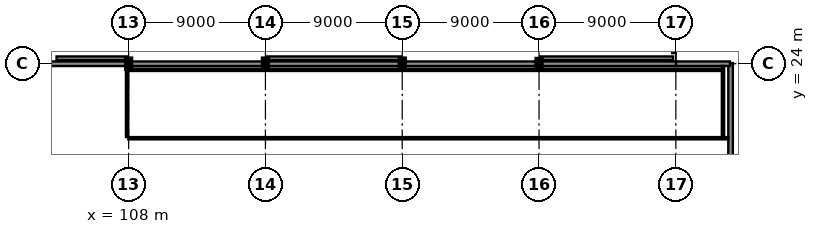
"""IFC4 building model, lengths in metres.
Left out: names, types, materials, properties, quantities, classifications, styles, units other than length and angle.
Written with IfcOpenShell. Run it as: python <this file> out.ifc"""

import sys

from ifc_helpers import new_model, si_unit, direction, frame, frame_2d, origin, origin_2d, place, context, subcontext, project, spatial, rectangle, i_section, extrude, element, fill, save


model = new_model("IFC4")
c1 = context("Model", 3, precision=1e-05, world=origin(), true_north=direction((0.0, 1.0)))
c2 = subcontext(c1, "Body", "Model", "MODEL_VIEW")
j1 = project(units=[si_unit("LENGTHUNIT", "METRE"), si_unit("PLANEANGLEUNIT", "RADIAN")], contexts=[c1])
p1 = place(None, origin())
s1 = spatial("IfcSite", under=j1, at=p1, CompositionType="ELEMENT")
p2 = place(p1, origin())
s2 = spatial("IfcBuilding", under=s1, at=p2, CompositionType="ELEMENT")
p3 = place(p2, frame((0.0, 0.0, 14.4)))
s3 = spatial("IfcBuildingStorey", under=s2, at=p3, CompositionType="ELEMENT", Elevation=14.4)
for number, where, z_axis, x_axis in (
    (1, (108.0, 24.0, 0.0), (0.0, 0.0, 1.0), (1.0, 0.0, 0.0)),
    (2, (117.0, 24.0, 0.0), (0.0, 0.0, 1.0), (1.0, 0.0, 0.0)),
    (3, (126.0, 24.0, 0.0), (0.0, 0.0, 1.0), (1.0, 0.0, 0.0)),
):
    element("IfcColumn", number, at=place(p3, frame(where, z_axis=z_axis, x_axis=x_axis)), inside=s3, PredefinedType="COLUMN", context=c2, shape_type="SweptSolid", body=[
        extrude(i_section(OverallWidth=0.3, OverallDepth=0.65, WebThickness=0.016, FlangeThickness=0.031, at=origin_2d()), origin(), (0.0, 0.0, 1.0), 4.5),
    ])
p4 = place(p3, frame((135.0, 24.0, 0.0), z_axis=(0.0, 0.0, 1.0), x_axis=(1.0, 0.0, 0.0)))
e4 = element("IfcColumn", 4, at=p4, inside=s3, PredefinedType="COLUMN", context=c2, shape_type="SweptSolid", body=[
    extrude(i_section(OverallWidth=0.3, OverallDepth=0.6, WebThickness=0.015, FlangeThickness=0.03, at=origin_2d()), origin(), (0.0, 0.0, 1.0), 4.5),
])
p5 = place(p3, frame((147.6, 11.99, 0.0), z_axis=(0.0, 0.0, 1.0), x_axis=(0.0, 1.0, 0.0)))
e5 = element("IfcWall", 5, at=p5, inside=s3, PredefinedType="SOLIDWALL", context=c2, shape_type="SweptSolid", body=[
    extrude(rectangle(XDim=12.05, YDim=0.3, at=frame_2d((6.025, 0.0))), origin(), (0.0, 0.0, 1.0), 3.475),
])
p6 = place(p5, frame((1.47, 0.0, 0.85)))
e6 = element("IfcOpeningElement", 6, at=p6, cuts=e5, PredefinedType="OPENING", context=c2, shape_type="SweptSolid", body=[
    extrude(rectangle(XDim=2.0, YDim=2.0, at=frame_2d((1.0, 1.0))), frame((0.0, 0.165, 0.0), z_axis=(0.0, -1.0, 0.0), x_axis=(1.0, 0.0, 0.0)), (0.0, 0.0, 1.0), 0.33),
])
p7 = place(p5, frame((7.676, 0.0, 0.85)))
e7 = element("IfcOpeningElement", 7, at=p7, cuts=e5, PredefinedType="OPENING", context=c2, shape_type="SweptSolid", body=[
    extrude(rectangle(XDim=2.0, YDim=2.0, at=frame_2d((1.0, 1.0))), frame((0.0, 0.165, 0.0), z_axis=(0.0, -1.0, 0.0), x_axis=(1.0, 0.0, 0.0)), (0.0, 0.0, 1.0), 0.33),
])
p8 = place(p3, frame((147.56, 24.0, 0.0), z_axis=(0.0, 0.0, 1.0), x_axis=(-1.0, 0.0, 0.0)))
e8 = element("IfcWall", 8, at=p8, inside=s3, PredefinedType="SOLIDWALL", context=c2, shape_type="SweptSolid", body=[
    extrude(rectangle(XDim=3.57, YDim=0.3, at=frame_2d((1.785, 0.0))), origin(), (0.0, 0.0, 1.0), 3.167),
])
p9 = place(p3, frame((144.01, 24.0, 0.0), z_axis=(0.0, 0.0, 1.0), x_axis=(-1.0, 0.0, 0.0)))
e9 = element("IfcWall", 9, at=p9, inside=s3, PredefinedType="SOLIDWALL", context=c2, shape_type="SweptSolid", body=[
    extrude(rectangle(XDim=9.002, YDim=0.3, at=frame_2d((4.501, 0.0))), origin(), (0.0, 0.0, 1.0), 3.167),
])
p10 = place(p3, frame((134.992, 24.0, 0.0), z_axis=(0.0, 0.0, 1.0), x_axis=(-1.0, 0.0, 0.0)))
e10 = element("IfcWall", 10, at=p10, inside=s3, PredefinedType="SOLIDWALL", context=c2, shape_type="SweptSolid", body=[
    extrude(rectangle(XDim=8.984, YDim=0.3, at=frame_2d((4.492, 0.0))), origin(), (0.0, 0.0, 1.0), 3.167),
])
p11 = place(p10, frame((2.045, 0.0, 0.9)))
e11 = element("IfcOpeningElement", 11, at=p11, cuts=e10, PredefinedType="OPENING", context=c2, shape_type="SweptSolid", body=[
    extrude(rectangle(XDim=1.3, YDim=1.3, at=frame_2d((0.65, 0.65))), frame((0.0, 0.165, 0.0), z_axis=(0.0, -1.0, 0.0), x_axis=(1.0, 0.0, 0.0)), (0.0, 0.0, 1.0), 0.33),
])
p12 = place(p10, frame((5.639, 0.0, 0.9)))
e12 = element("IfcOpeningElement", 12, at=p12, cuts=e10, PredefinedType="OPENING", context=c2, shape_type="SweptSolid", body=[
    extrude(rectangle(XDim=1.3, YDim=1.3, at=frame_2d((0.65, 0.65))), frame((0.0, 0.165, 0.0), z_axis=(0.0, -1.0, 0.0), x_axis=(1.0, 0.0, 0.0)), (0.0, 0.0, 1.0), 0.33),
])
p13 = place(p3, frame((125.992, 24.0, 0.0), z_axis=(0.0, 0.0, 1.0), x_axis=(-1.0, 0.0, 0.0)))
e13 = element("IfcWall", 13, at=p13, inside=s3, PredefinedType="SOLIDWALL", context=c2, shape_type="SweptSolid", body=[
    extrude(rectangle(XDim=8.984, YDim=0.3, at=frame_2d((4.492, 0.0))), origin(), (0.0, 0.0, 1.0), 3.167),
])
p14 = place(p13, frame((2.045, 0.0, 0.9)))
e14 = element("IfcOpeningElement", 14, at=p14, cuts=e13, PredefinedType="OPENING", context=c2, shape_type="SweptSolid", body=[
    extrude(rectangle(XDim=1.3, YDim=1.3, at=frame_2d((0.65, 0.65))), frame((0.0, 0.165, 0.0), z_axis=(0.0, -1.0, 0.0), x_axis=(1.0, 0.0, 0.0)), (0.0, 0.0, 1.0), 0.33),
])
p15 = place(p13, frame((5.639, 0.0, 0.9)))
e15 = element("IfcOpeningElement", 15, at=p15, cuts=e13, PredefinedType="OPENING", context=c2, shape_type="SweptSolid", body=[
    extrude(rectangle(XDim=1.3, YDim=1.3, at=frame_2d((0.65, 0.65))), frame((0.0, 0.165, 0.0), z_axis=(0.0, -1.0, 0.0), x_axis=(1.0, 0.0, 0.0)), (0.0, 0.0, 1.0), 0.33),
])
p16 = place(p3, frame((116.992, 24.0, 0.0), z_axis=(0.0, 0.0, 1.0), x_axis=(-1.0, 0.0, 0.0)))
e16 = element("IfcWall", 16, at=p16, inside=s3, PredefinedType="SOLIDWALL", context=c2, shape_type="SweptSolid", body=[
    extrude(rectangle(XDim=8.984, YDim=0.3, at=frame_2d((4.492, 0.0))), origin(), (0.0, 0.0, 1.0), 3.167),
])
p17 = place(p16, frame((2.045, 0.0, 0.9)))
e17 = element("IfcOpeningElement", 17, at=p17, cuts=e16, PredefinedType="OPENING", context=c2, shape_type="SweptSolid", body=[
    extrude(rectangle(XDim=1.3, YDim=1.3, at=frame_2d((0.65, 0.65))), frame((0.0, 0.165, 0.0), z_axis=(0.0, -1.0, 0.0), x_axis=(1.0, 0.0, 0.0)), (0.0, 0.0, 1.0), 0.33),
])
p18 = place(p16, frame((5.639, 0.0, 0.9)))
e18 = element("IfcOpeningElement", 18, at=p18, cuts=e16, PredefinedType="OPENING", context=c2, shape_type="SweptSolid", body=[
    extrude(rectangle(XDim=1.3, YDim=1.3, at=frame_2d((0.65, 0.65))), frame((0.0, 0.165, 0.0), z_axis=(0.0, -1.0, 0.0), x_axis=(1.0, 0.0, 0.0)), (0.0, 0.0, 1.0), 0.33),
])
p19 = place(p3, frame((107.992, 24.0, 0.0), z_axis=(0.0, 0.0, 1.0), x_axis=(-1.0, 0.0, 0.0)))
e19 = element("IfcWall", 19, at=p19, inside=s3, PredefinedType="SOLIDWALL", context=c2, shape_type="SweptSolid", body=[
    extrude(rectangle(XDim=8.619, YDim=0.3, at=frame_2d((4.31, 0.0))), origin(), (0.0, 0.0, 1.0), 3.275),
])
p20 = place(p19, frame((3.992, 0.0, 0.0)))
e20 = element("IfcOpeningElement", 20, at=p20, cuts=e19, PredefinedType="OPENING", context=c2, shape_type="SweptSolid", body=[
    extrude(rectangle(XDim=1.0, YDim=2.2, at=frame_2d((0.5, 1.1))), frame((0.0, 0.165, 0.0), z_axis=(0.0, -1.0, 0.0), x_axis=(1.0, 0.0, 0.0)), (0.0, 0.0, 1.0), 0.33),
])
p21 = place(p3, frame((103.26, 24.36, 0.0), z_axis=(0.0, 0.0, 1.0), x_axis=(1.0, 0.0, 0.0)))
e21 = element("IfcWall", 21, at=p21, inside=s3, PredefinedType="PARAPET", context=c2, shape_type="SweptSolid", body=[
    extrude(rectangle(XDim=4.68, YDim=0.24, at=frame_2d((2.34, 0.0))), origin(), (0.0, 0.0, 1.0), 0.8),
])
p22 = place(p3, frame((117.06, 24.36, 0.0), z_axis=(0.0, 0.0, 1.0), x_axis=(1.0, 0.0, 0.0)))
e22 = element("IfcWall", 22, at=p22, inside=s3, PredefinedType="PARAPET", context=c2, shape_type="SweptSolid", body=[
    extrude(rectangle(XDim=8.88, YDim=0.24, at=frame_2d((4.44, 0.0))), origin(), (0.0, 0.0, 1.0), 0.8),
])
p23 = place(p3, frame((135.06, 24.36, 0.0), z_axis=(0.0, 0.0, 1.0), x_axis=(1.0, 0.0, 0.0)))
e23 = element("IfcWall", 23, at=p23, inside=s3, PredefinedType="PARAPET", context=c2, shape_type="SweptSolid", body=[
    extrude(rectangle(XDim=8.76, YDim=0.24, at=frame_2d((4.38, 0.0))), origin(), (0.0, 0.0, 1.0), 0.8),
])
p24 = place(p3, frame((143.88, 24.7, 0.0), z_axis=(0.0, 0.0, 1.0), x_axis=(0.0, 1.0, 0.0)))
e24 = element("IfcWall", 24, at=p24, inside=s3, PredefinedType="PARAPET", context=c2, shape_type="SweptSolid", body=[
    extrude(rectangle(XDim=16.88, YDim=0.24, at=frame_2d((8.44, 0.0))), origin(), (0.0, 0.0, 1.0), 0.8),
])
p25 = place(p3, frame((147.1, 23.855, 0.0), z_axis=(0.0, 0.0, 1.0), x_axis=(0.0, -1.0, 0.0)))
e25 = element("IfcWall", 25, at=p25, inside=s3, PredefinedType="PARTITIONING", context=c2, shape_type="SweptSolid", body=[
    extrude(rectangle(XDim=4.675, YDim=0.15, at=frame_2d((2.337, 0.0))), origin(), (0.0, 0.0, 1.0), 4.14),
])
p26 = place(p3, frame((147.455, 19.1, 0.0), z_axis=(0.0, 0.0, 1.0), x_axis=(-1.0, 0.0, 0.0)))
e26 = element("IfcWall", 26, at=p26, inside=s3, PredefinedType="PARTITIONING", context=c2, shape_type="SweptSolid", body=[
    extrude(rectangle(XDim=39.475, YDim=0.15, at=frame_2d((19.738, 0.0))), origin(), (0.0, 0.0, 1.0), 4.14),
])
p27 = place(p26, frame((19.213, 0.0, 0.0)))
e27 = element("IfcOpeningElement", 27, at=p27, cuts=e26, PredefinedType="OPENING", context=c2, shape_type="SweptSolid", body=[
    extrude(rectangle(XDim=1.05, YDim=2.25, at=frame_2d((0.525, 1.125))), frame((0.0, 0.09, 0.0), z_axis=(0.0, -1.0, 0.0), x_axis=(1.0, 0.0, 0.0)), (0.0, 0.0, 1.0), 0.18),
])
p28 = place(p3, frame((107.9, 19.18, 0.0), z_axis=(0.0, 0.0, 1.0), x_axis=(0.0, 1.0, 0.0)))
e28 = element("IfcWall", 28, at=p28, inside=s3, PredefinedType="PARTITIONING", context=c2, shape_type="SweptSolid", body=[
    extrude(rectangle(XDim=4.497, YDim=0.15, at=frame_2d((2.249, 0.0))), origin(), (0.0, 0.0, 1.0), 3.625),
])
p29 = place(p3, frame((107.908, 23.6, 0.0), z_axis=(0.0, 0.0, 1.0), x_axis=(1.0, 0.0, 0.0)))
e29 = element("IfcWall", 29, at=p29, inside=s3, PredefinedType="PARTITIONING", context=c2, shape_type="SweptSolid", body=[
    extrude(rectangle(XDim=39.122, YDim=0.15, at=frame_2d((19.561, 0.0))), origin(), (0.0, 0.0, 1.0), 4.14),
])
p30 = place(p20, frame((1.0, 0.0, 0.0), z_axis=(0.0, 0.0, 1.0), x_axis=(-1.0, 0.0, 0.0)))
e30 = element("IfcDoor", 30, at=p30, inside=s3, OperationType="SINGLE_SWING_LEFT", PredefinedType="DOOR", context=c2, shape_type="SweptSolid", body=[
    extrude(rectangle(XDim=1.0, YDim=2.2, at=frame_2d((0.5, 1.1))), frame((0.0, 0.025, 0.0), z_axis=(0.0, -1.0, 0.0), x_axis=(1.0, 0.0, 0.0)), (0.0, 0.0, 1.0), 0.05),
])
fill(e20, e30)
p31 = place(p7, origin())
e31 = element("IfcWindow", 31, at=p31, inside=s3, PartitioningType="SINGLE_PANEL", PredefinedType="WINDOW", context=c2, shape_type="SweptSolid", body=[
    extrude(rectangle(XDim=2.0, YDim=2.0, at=frame_2d((1.0, 1.0))), frame((0.0, 0.03, 0.0), z_axis=(0.0, -1.0, 0.0), x_axis=(1.0, 0.0, 0.0)), (0.0, 0.0, 1.0), 0.06),
])
fill(e7, e31)
p32 = place(p11, origin())
e32 = element("IfcWindow", 32, at=p32, inside=s3, PartitioningType="SINGLE_PANEL", PredefinedType="WINDOW", context=c2, shape_type="SweptSolid", body=[
    extrude(rectangle(XDim=1.3, YDim=1.3, at=frame_2d((0.65, 0.65))), frame((0.0, 0.03, 0.0), z_axis=(0.0, -1.0, 0.0), x_axis=(1.0, 0.0, 0.0)), (0.0, 0.0, 1.0), 0.06),
])
fill(e11, e32)
p33 = place(p12, origin())
e33 = element("IfcWindow", 33, at=p33, inside=s3, PartitioningType="SINGLE_PANEL", PredefinedType="WINDOW", context=c2, shape_type="SweptSolid", body=[
    extrude(rectangle(XDim=1.3, YDim=1.3, at=frame_2d((0.65, 0.65))), frame((0.0, 0.03, 0.0), z_axis=(0.0, -1.0, 0.0), x_axis=(1.0, 0.0, 0.0)), (0.0, 0.0, 1.0), 0.06),
])
fill(e12, e33)
p34 = place(p14, origin())
e34 = element("IfcWindow", 34, at=p34, inside=s3, PartitioningType="SINGLE_PANEL", PredefinedType="WINDOW", context=c2, shape_type="SweptSolid", body=[
    extrude(rectangle(XDim=1.3, YDim=1.3, at=frame_2d((0.65, 0.65))), frame((0.0, 0.03, 0.0), z_axis=(0.0, -1.0, 0.0), x_axis=(1.0, 0.0, 0.0)), (0.0, 0.0, 1.0), 0.06),
])
fill(e14, e34)
p35 = place(p15, origin())
e35 = element("IfcWindow", 35, at=p35, inside=s3, PartitioningType="SINGLE_PANEL", PredefinedType="WINDOW", context=c2, shape_type="SweptSolid", body=[
    extrude(rectangle(XDim=1.3, YDim=1.3, at=frame_2d((0.65, 0.65))), frame((0.0, 0.03, 0.0), z_axis=(0.0, -1.0, 0.0), x_axis=(1.0, 0.0, 0.0)), (0.0, 0.0, 1.0), 0.06),
])
fill(e15, e35)
p36 = place(p17, origin())
e36 = element("IfcWindow", 36, at=p36, inside=s3, PartitioningType="SINGLE_PANEL", PredefinedType="WINDOW", context=c2, shape_type="SweptSolid", body=[
    extrude(rectangle(XDim=1.3, YDim=1.3, at=frame_2d((0.65, 0.65))), frame((0.0, 0.03, 0.0), z_axis=(0.0, -1.0, 0.0), x_axis=(1.0, 0.0, 0.0)), (0.0, 0.0, 1.0), 0.06),
])
fill(e17, e36)
p37 = place(p18, origin())
e37 = element("IfcWindow", 37, at=p37, inside=s3, PartitioningType="SINGLE_PANEL", PredefinedType="WINDOW", context=c2, shape_type="SweptSolid", body=[
    extrude(rectangle(XDim=1.3, YDim=1.3, at=frame_2d((0.65, 0.65))), frame((0.0, 0.03, 0.0), z_axis=(0.0, -1.0, 0.0), x_axis=(1.0, 0.0, 0.0)), (0.0, 0.0, 1.0), 0.06),
])
fill(e18, e37)
p38 = place(p27, frame((1.05, 0.0, 0.0), z_axis=(0.0, 0.0, 1.0), x_axis=(-1.0, 0.0, 0.0)))
e38 = element("IfcDoor", 38, at=p38, inside=s3, OperationType="SINGLE_SWING_LEFT", PredefinedType="DOOR", context=c2, shape_type="SweptSolid", body=[
    extrude(rectangle(XDim=1.05, YDim=2.25, at=frame_2d((0.525, 1.125))), frame((0.0, 0.025, 0.0), z_axis=(0.0, -1.0, 0.0), x_axis=(1.0, 0.0, 0.0)), (0.0, 0.0, 1.0), 0.05),
])
fill(e27, e38)
save(model, sys.argv[1])
